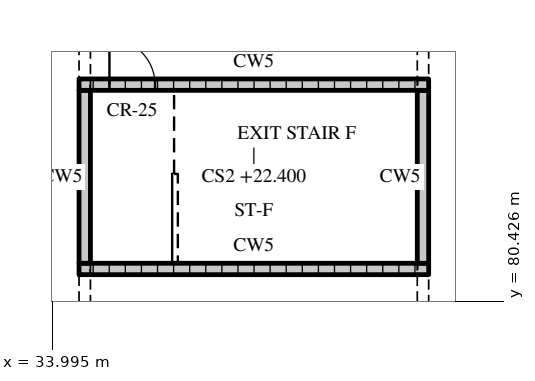
"""IFC4 building model, lengths in metres.
Left out: names, types, materials, properties, quantities, classifications, styles, units other than length and angle.
Written with IfcOpenShell. Run it as: python <this file> out.ifc"""

import sys

from ifc_helpers import new_model, si_unit, direction, frame, frame_2d, origin, place, context, subcontext, project, spatial, rectangle, extrude, element, fill, save


model = new_model("IFC4")
c1 = context("Model", 3, precision=1e-05, world=origin(), true_north=direction((0.0, 1.0)))
c2 = subcontext(c1, "Body", "Model", "MODEL_VIEW")
j1 = project(units=[si_unit("LENGTHUNIT", "METRE"), si_unit("PLANEANGLEUNIT", "RADIAN")], contexts=[c1])
p1 = place(None, origin())
s1 = spatial("IfcSite", under=j1, at=p1, CompositionType="ELEMENT")
p2 = place(p1, origin())
s2 = spatial("IfcBuilding", under=s1, at=p2, CompositionType="ELEMENT")
p3 = place(p2, frame((0.0, 0.0, 19.2)))
s3 = spatial("IfcBuildingStorey", under=s2, at=p3, CompositionType="ELEMENT", Elevation=19.2)
p4 = place(p3, frame((34.7, 81.275, 0.0), z_axis=(0.0, 0.0, 1.0), x_axis=(1.0, 0.0, 0.0)))
e1 = element("IfcWall", 1, at=p4, inside=s3, PredefinedType="SOLIDWALL", context=c2, shape_type="SweptSolid", body=[
    extrude(rectangle(XDim=9.2, YDim=0.3, at=frame_2d((4.6, 0.0))), origin(), (0.0, 0.0, 1.0), 3.0),
])
for number, where, z_axis, x_axis in (
    (2, (34.85, 81.425, 0.0), (0.0, 0.0, 1.0), (0.0, 1.0, 0.0)),
    (3, (43.75, 81.425, 0.0), (0.0, 0.0, 1.0), (0.0, 1.0, 0.0)),
):
    element("IfcWall", number, at=place(p3, frame(where, z_axis=z_axis, x_axis=x_axis)), inside=s3, PredefinedType="SOLIDWALL", context=c2, shape_type="SweptSolid", body=[
        extrude(rectangle(XDim=4.55, YDim=0.3, at=frame_2d((2.275, 0.0))), origin(), (0.0, 0.0, 1.0), 3.0),
    ])
p5 = place(p3, frame((34.7, 86.125, 0.0), z_axis=(0.0, 0.0, 1.0), x_axis=(1.0, 0.0, 0.0)))
e4 = element("IfcWall", 4, at=p5, inside=s3, PredefinedType="SOLIDWALL", context=c2, shape_type="SweptSolid", body=[
    extrude(rectangle(XDim=9.2, YDim=0.3, at=frame_2d((4.6, 0.0))), origin(), (0.0, 0.0, 1.0), 3.0),
])
p6 = place(p5, frame((0.8, 0.0, 0.0)))
e5 = element("IfcOpeningElement", 5, at=p6, cuts=e4, PredefinedType="OPENING", context=c2, shape_type="SweptSolid", body=[
    extrude(rectangle(XDim=1.2, YDim=2.1, at=frame_2d((0.6, 1.05))), frame((0.0, 0.16, 0.0), z_axis=(0.0, -1.0, 0.0), x_axis=(1.0, 0.0, 0.0)), (0.0, 0.0, 1.0), 0.32),
])
p7 = place(p6, origin())
e6 = element("IfcDoor", 6, at=p7, inside=s3, OperationType="SINGLE_SWING_LEFT", PredefinedType="DOOR", context=c2, shape_type="SweptSolid", body=[
    extrude(rectangle(XDim=1.2, YDim=2.1, at=frame_2d((0.6, 1.05))), frame((0.0, 0.025, 0.0), z_axis=(0.0, -1.0, 0.0), x_axis=(1.0, 0.0, 0.0)), (0.0, 0.0, 1.0), 0.05),
])
fill(e5, e6)
save(model, sys.argv[1])
